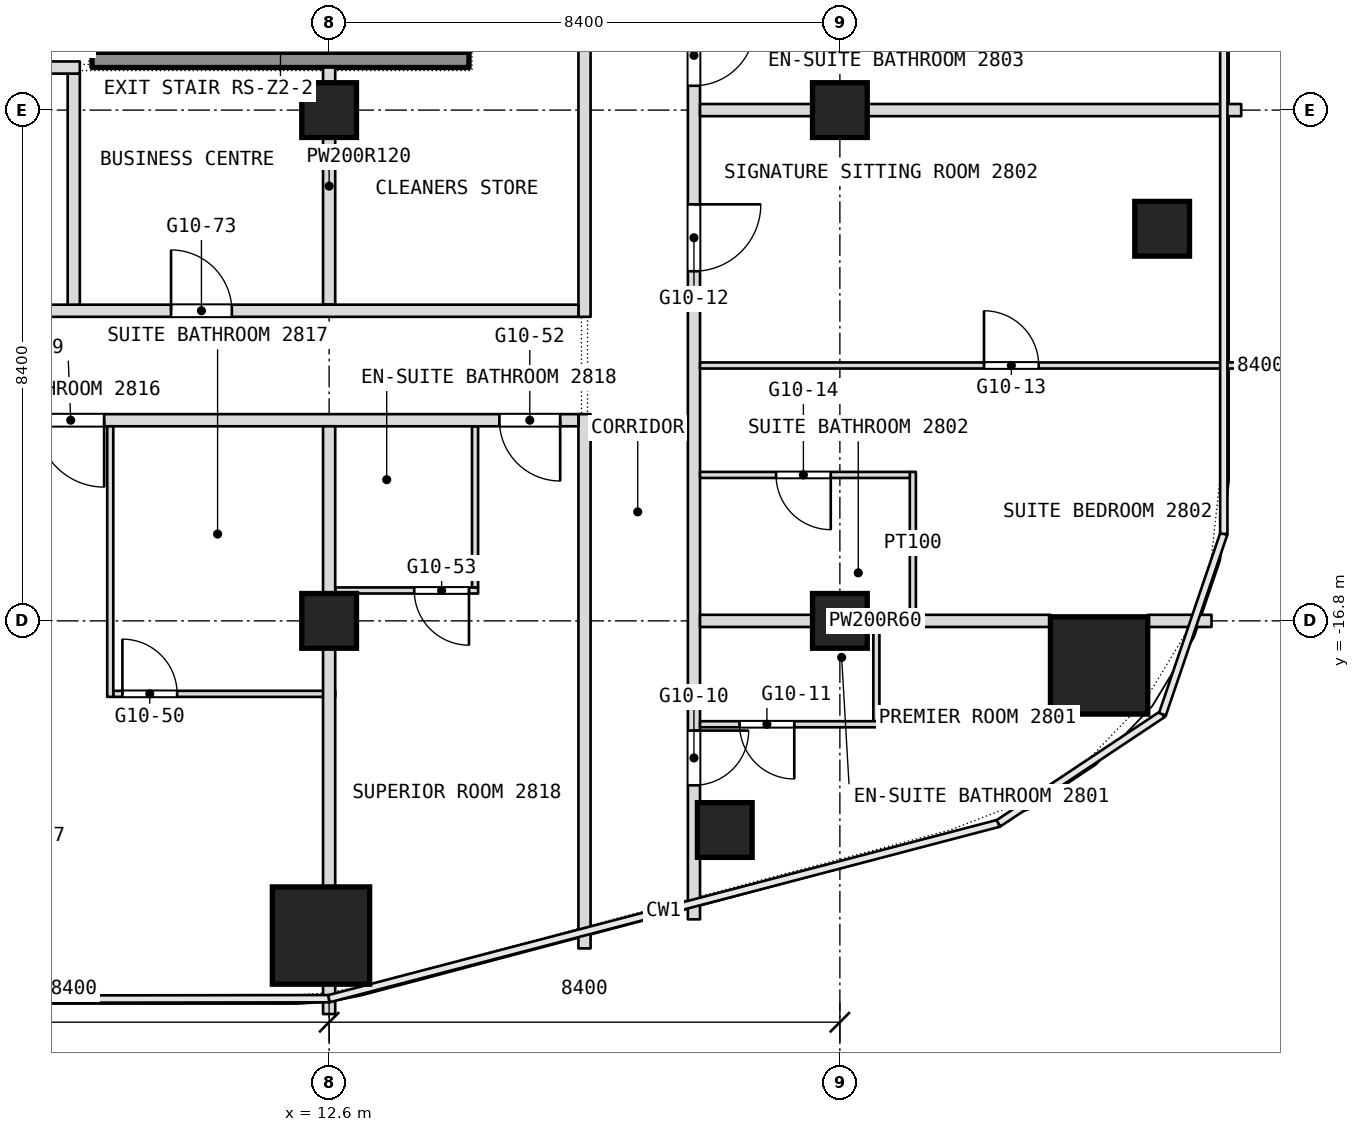
"""IFC4 building model, lengths in metres.
Left out: names, types, materials, properties, quantities, classifications, styles, units other than length and angle.
Written with IfcOpenShell. Run it as: python <this file> out.ifc"""

import sys

from ifc_helpers import new_model, si_unit, direction, frame, frame_2d, origin, origin_2d, place, context, subcontext, project, spatial, rectangle, extrude, element, fill, save


model = new_model("IFC4")
c1 = context("Model", 3, precision=1e-05, world=origin(), true_north=direction((0.0, 1.0)))
c2 = subcontext(c1, "Body", "Model", "MODEL_VIEW")
j1 = project(units=[si_unit("LENGTHUNIT", "METRE"), si_unit("PLANEANGLEUNIT", "RADIAN")], contexts=[c1])
p1 = place(None, origin())
s1 = spatial("IfcSite", under=j1, at=p1, CompositionType="ELEMENT")
p2 = place(p1, origin())
s2 = spatial("IfcBuilding", under=s1, at=p2, CompositionType="ELEMENT")
p3 = place(p2, frame((0.0, 0.0, 126.5)))
s3 = spatial("IfcBuildingStorey", under=s2, at=p3, CompositionType="ELEMENT", Elevation=126.5)
for number, where, z_axis, x_axis in (
    (1, (12.466, -21.975, 0.0), (0.0, 0.0, 1.0), (1.0, 0.0, 0.0)),
    (2, (25.263, -17.533, 0.0), (0.0, 0.0, 1.0), (1.0, 0.0, 0.0)),
):
    element("IfcColumn", number, at=place(p3, frame(where, z_axis=z_axis, x_axis=x_axis)), inside=s3, PredefinedType="COLUMN", context=c2, shape_type="SweptSolid", body=[
        extrude(rectangle(XDim=1.6, YDim=1.6, at=origin_2d()), origin(), (0.0, 0.0, 1.0), 3.6),
    ])
for number, where, z_axis, x_axis in (
    (3, (12.6, -16.8, 0.0), (0.0, 0.0, 1.0), (1.0, 0.0, 0.0)),
    (4, (12.6, -8.4, 0.0), (0.0, 0.0, 1.0), (1.0, 0.0, 0.0)),
    (5, (21.0, -16.8, 0.0), (0.0, 0.0, 1.0), (1.0, 0.0, 0.0)),
    (6, (21.0, -8.4, 0.0), (0.0, 0.0, 1.0), (1.0, 0.0, 0.0)),
    (7, (26.3, -10.352, 0.0), (0.0, 0.0, 1.0), (1.0, 0.0, 0.0)),
    (8, (19.107, -20.239, 0.0), (0.0, 0.0, 1.0), (1.0, 0.0, 0.0)),
):
    element("IfcColumn", number, at=place(p3, frame(where, z_axis=z_axis, x_axis=x_axis)), inside=s3, PredefinedType="COLUMN", context=c2, shape_type="SweptSolid", body=[
        extrude(rectangle(XDim=0.9, YDim=0.9, at=origin_2d()), origin(), (0.0, 0.0, 1.0), 3.6),
    ])
p4 = place(p3, frame((22.2, -16.7, 0.0), z_axis=(0.0, 0.0, 1.0), x_axis=(0.0, 1.0, 0.0)))
e9 = element("IfcWall", 9, at=p4, inside=s3, PredefinedType="PARTITIONING", context=c2, shape_type="SweptSolid", body=[
    extrude(rectangle(XDim=2.35, YDim=0.1, at=frame_2d((1.175, 0.0))), origin(), (0.0, 0.0, 1.0), 3.34),
])
p5 = place(p3, frame((21.6, -18.45, 0.0), z_axis=(0.0, 0.0, 1.0), x_axis=(0.0, 1.0, 0.0)))
e10 = element("IfcWall", 10, at=p5, inside=s3, PredefinedType="PARTITIONING", context=c2, shape_type="SweptSolid", body=[
    extrude(rectangle(XDim=1.75, YDim=0.1, at=frame_2d((0.875, 0.0))), origin(), (0.0, 0.0, 1.0), 3.34),
])
p6 = place(p3, frame((18.6, -21.708, 0.0), z_axis=(0.0, 0.0, 1.0), x_axis=(0.0, 1.0, 0.0)))
e11 = element("IfcWall", 11, at=p6, inside=s3, PredefinedType="PARTITIONING", context=c2, shape_type="SweptSolid", body=[
    extrude(rectangle(XDim=49.648, YDim=0.2, at=frame_2d((24.824, 0.0))), origin(), (0.0, 0.0, 1.0), 3.34),
])
p7 = place(p6, frame((2.204, 0.0, 0.0)))
e12 = element("IfcOpeningElement", 12, at=p7, cuts=e11, PredefinedType="OPENING", context=c2, shape_type="SweptSolid", body=[
    extrude(rectangle(XDim=0.9, YDim=2.1, at=frame_2d((0.45, 1.05))), frame((0.0, 0.1, 0.0), z_axis=(0.0, -1.0, 0.0), x_axis=(1.0, 0.0, 0.0)), (0.0, 0.0, 1.0), 0.2),
])
p8 = place(p6, frame((10.658, 0.0, 0.0)))
e13 = element("IfcOpeningElement", 13, at=p8, cuts=e11, PredefinedType="OPENING", context=c2, shape_type="SweptSolid", body=[
    extrude(rectangle(XDim=1.1, YDim=2.1, at=frame_2d((0.55, 1.05))), frame((0.0, 0.1, 0.0), z_axis=(0.0, -1.0, 0.0), x_axis=(1.0, 0.0, 0.0)), (0.0, 0.0, 1.0), 0.2),
])
p9 = place(p6, frame((13.708, 0.0, 0.0)))
e14 = element("IfcOpeningElement", 14, at=p9, cuts=e11, PredefinedType="OPENING", context=c2, shape_type="SweptSolid", body=[
    extrude(rectangle(XDim=1.0, YDim=2.1, at=frame_2d((0.5, 1.05))), frame((0.0, 0.1, 0.0), z_axis=(0.0, -1.0, 0.0), x_axis=(1.0, 0.0, 0.0)), (0.0, 0.0, 1.0), 0.2),
])
p10 = place(p6, frame((20.308, 0.0, 0.0)))
e15 = element("IfcOpeningElement", 15, at=p10, cuts=e11, PredefinedType="OPENING", context=c2, shape_type="SweptSolid", body=[
    extrude(rectangle(XDim=1.0, YDim=2.1, at=frame_2d((0.5, 1.05))), frame((0.0, 0.1, 0.0), z_axis=(0.0, -1.0, 0.0), x_axis=(1.0, 0.0, 0.0)), (0.0, 0.0, 1.0), 0.2),
])
p11 = place(p6, frame((25.408, 0.0, 0.0)))
e16 = element("IfcOpeningElement", 16, at=p11, cuts=e11, PredefinedType="OPENING", context=c2, shape_type="SweptSolid", body=[
    extrude(rectangle(XDim=1.1, YDim=2.1, at=frame_2d((0.55, 1.05))), frame((0.0, 0.1, 0.0), z_axis=(0.0, -1.0, 0.0), x_axis=(1.0, 0.0, 0.0)), (0.0, 0.0, 1.0), 0.2),
])
p12 = place(p6, frame((30.508, 0.0, 0.0)))
e17 = element("IfcOpeningElement", 17, at=p12, cuts=e11, PredefinedType="OPENING", context=c2, shape_type="SweptSolid", body=[
    extrude(rectangle(XDim=1.0, YDim=2.1, at=frame_2d((0.5, 1.05))), frame((0.0, 0.1, 0.0), z_axis=(0.0, -1.0, 0.0), x_axis=(1.0, 0.0, 0.0)), (0.0, 0.0, 1.0), 0.2),
])
p13 = place(p6, frame((37.108, 0.0, 0.0)))
e18 = element("IfcOpeningElement", 18, at=p13, cuts=e11, PredefinedType="OPENING", context=c2, shape_type="SweptSolid", body=[
    extrude(rectangle(XDim=1.0, YDim=2.1, at=frame_2d((0.5, 1.05))), frame((0.0, 0.1, 0.0), z_axis=(0.0, -1.0, 0.0), x_axis=(1.0, 0.0, 0.0)), (0.0, 0.0, 1.0), 0.2),
])
p14 = place(p6, frame((42.608, 0.0, 0.0)))
e19 = element("IfcOpeningElement", 19, at=p14, cuts=e11, PredefinedType="OPENING", context=c2, shape_type="SweptSolid", body=[
    extrude(rectangle(XDim=1.0, YDim=2.1, at=frame_2d((0.5, 1.05))), frame((0.0, 0.1, 0.0), z_axis=(0.0, -1.0, 0.0), x_axis=(1.0, 0.0, 0.0)), (0.0, 0.0, 1.0), 0.2),
])
p15 = place(p6, frame((44.608, 0.0, 0.0)))
e20 = element("IfcOpeningElement", 20, at=p15, cuts=e11, PredefinedType="OPENING", context=c2, shape_type="SweptSolid", body=[
    extrude(rectangle(XDim=1.0, YDim=2.1, at=frame_2d((0.5, 1.05))), frame((0.0, 0.1, 0.0), z_axis=(0.0, -1.0, 0.0), x_axis=(1.0, 0.0, 0.0)), (0.0, 0.0, 1.0), 0.2),
])
p16 = place(p3, frame((18.7, -18.5, 0.0), z_axis=(0.0, 0.0, 1.0), x_axis=(1.0, 0.0, 0.0)))
e21 = element("IfcWall", 21, at=p16, inside=s3, PredefinedType="PARTITIONING", context=c2, shape_type="SweptSolid", body=[
    extrude(rectangle(XDim=2.95, YDim=0.1, at=frame_2d((1.475, 0.0))), origin(), (0.0, 0.0, 1.0), 3.34),
])
p17 = place(p16, frame((0.65, 0.0, 0.0)))
e22 = element("IfcOpeningElement", 22, at=p17, cuts=e21, PredefinedType="OPENING", context=c2, shape_type="SweptSolid", body=[
    extrude(rectangle(XDim=0.9, YDim=2.1, at=frame_2d((0.45, 1.05))), frame((0.0, 0.05, 0.0), z_axis=(0.0, -1.0, 0.0), x_axis=(1.0, 0.0, 0.0)), (0.0, 0.0, 1.0), 0.1),
])
p18 = place(p3, frame((9.05, -18.0, 0.0), z_axis=(0.0, 0.0, 1.0), x_axis=(1.0, 0.0, 0.0)))
e23 = element("IfcWall", 23, at=p18, inside=s3, PredefinedType="PARTITIONING", context=c2, shape_type="SweptSolid", body=[
    extrude(rectangle(XDim=3.65, YDim=0.1, at=frame_2d((1.825, 0.0))), origin(), (0.0, 0.0, 1.0), 3.34),
])
p19 = place(p18, frame((0.15, 0.0, 0.0)))
e24 = element("IfcOpeningElement", 24, at=p19, cuts=e23, PredefinedType="OPENING", context=c2, shape_type="SweptSolid", body=[
    extrude(rectangle(XDim=0.9, YDim=2.1, at=frame_2d((0.45, 1.05))), frame((0.0, 0.05, 0.0), z_axis=(0.0, -1.0, 0.0), x_axis=(1.0, 0.0, 0.0)), (0.0, 0.0, 1.0), 0.1),
])
p20 = place(p3, frame((16.8, -22.186, 0.0), z_axis=(0.0, 0.0, 1.0), x_axis=(0.0, 1.0, 0.0)))
e25 = element("IfcWall", 25, at=p20, inside=s3, PredefinedType="PARTITIONING", context=c2, shape_type="SweptSolid", body=[
    extrude(rectangle(XDim=8.786, YDim=0.2, at=frame_2d((4.393, 0.0))), origin(), (0.0, 0.0, 1.0), 3.34),
])
p21 = place(p3, frame((16.8, -11.8, 0.0), z_axis=(0.0, 0.0, 1.0), x_axis=(0.0, 1.0, 0.0)))
e26 = element("IfcWall", 26, at=p21, inside=s3, PredefinedType="PARTITIONING", context=c2, shape_type="SweptSolid", body=[
    extrude(rectangle(XDim=9.9, YDim=0.2, at=frame_2d((4.95, 0.0))), origin(), (0.0, 0.0, 1.0), 3.34),
])
p22 = place(p3, frame((18.7, -16.8, 0.0), z_axis=(0.0, 0.0, 1.0), x_axis=(1.0, 0.0, 0.0)))
e27 = element("IfcWall", 27, at=p22, inside=s3, PredefinedType="PARTITIONING", context=c2, shape_type="SweptSolid", body=[
    extrude(rectangle(XDim=5.763, YDim=0.2, at=frame_2d((2.881, 0.0))), origin(), (0.0, 0.0, 1.0), 2.89),
])
p23 = place(p3, frame((26.063, -16.8, 0.0), z_axis=(0.0, 0.0, 1.0), x_axis=(1.0, 0.0, 0.0)))
e28 = element("IfcWall", 28, at=p23, inside=s3, PredefinedType="PARTITIONING", context=c2, shape_type="SweptSolid", body=[
    extrude(rectangle(XDim=1.049, YDim=0.2, at=frame_2d((0.524, 0.0))), origin(), (0.0, 0.0, 1.0), 3.34),
])
p24 = place(p3, frame((12.7, -16.3, 0.0), z_axis=(0.0, 0.0, 1.0), x_axis=(1.0, 0.0, 0.0)))
e29 = element("IfcWall", 29, at=p24, inside=s3, PredefinedType="PARTITIONING", context=c2, shape_type="SweptSolid", body=[
    extrude(rectangle(XDim=2.35, YDim=0.1, at=frame_2d((1.175, 0.0))), origin(), (0.0, 0.0, 1.0), 3.34),
])
p25 = place(p24, frame((1.3, 0.0, 0.0)))
e30 = element("IfcOpeningElement", 30, at=p25, cuts=e29, PredefinedType="OPENING", context=c2, shape_type="SweptSolid", body=[
    extrude(rectangle(XDim=0.9, YDim=2.1, at=frame_2d((0.45, 1.05))), frame((0.0, 0.05, 0.0), z_axis=(0.0, -1.0, 0.0), x_axis=(1.0, 0.0, 0.0)), (0.0, 0.0, 1.0), 0.1),
])
p26 = place(p3, frame((15.0, -16.25, 0.0), z_axis=(0.0, 0.0, 1.0), x_axis=(0.0, 1.0, 0.0)))
e31 = element("IfcWall", 31, at=p26, inside=s3, PredefinedType="PARTITIONING", context=c2, shape_type="SweptSolid", body=[
    extrude(rectangle(XDim=2.65, YDim=0.1, at=frame_2d((1.325, 0.0))), origin(), (0.0, 0.0, 1.0), 3.34),
])
p27 = place(p3, frame((18.7, -14.4, 0.0), z_axis=(0.0, 0.0, 1.0), x_axis=(1.0, 0.0, 0.0)))
e32 = element("IfcWall", 32, at=p27, inside=s3, PredefinedType="PARTITIONING", context=c2, shape_type="SweptSolid", body=[
    extrude(rectangle(XDim=3.45, YDim=0.1, at=frame_2d((1.725, 0.0))), origin(), (0.0, 0.0, 1.0), 3.34),
])
p28 = place(p27, frame((1.25, 0.0, 0.0)))
e33 = element("IfcOpeningElement", 33, at=p28, cuts=e32, PredefinedType="OPENING", context=c2, shape_type="SweptSolid", body=[
    extrude(rectangle(XDim=0.9, YDim=2.1, at=frame_2d((0.45, 1.05))), frame((0.0, 0.05, 0.0), z_axis=(0.0, -1.0, 0.0), x_axis=(1.0, 0.0, 0.0)), (0.0, 0.0, 1.0), 0.1),
])
p29 = place(p3, frame((-3.2, -13.5, 0.0), z_axis=(0.0, 0.0, 1.0), x_axis=(1.0, 0.0, 0.0)))
e34 = element("IfcWall", 34, at=p29, inside=s3, PredefinedType="PARTITIONING", context=c2, shape_type="SweptSolid", body=[
    extrude(rectangle(XDim=19.9, YDim=0.2, at=frame_2d((9.95, 0.0))), origin(), (0.0, 0.0, 1.0), 3.34),
])
p30 = place(p29, frame((1.8, 0.0, 0.0)))
e35 = element("IfcOpeningElement", 35, at=p30, cuts=e34, PredefinedType="OPENING", context=c2, shape_type="SweptSolid", body=[
    extrude(rectangle(XDim=1.0, YDim=2.1, at=frame_2d((0.5, 1.05))), frame((0.0, 0.1, 0.0), z_axis=(0.0, -1.0, 0.0), x_axis=(1.0, 0.0, 0.0)), (0.0, 0.0, 1.0), 0.2),
])
p31 = place(p29, frame((3.6, 0.0, 0.0)))
e36 = element("IfcOpeningElement", 36, at=p31, cuts=e34, PredefinedType="OPENING", context=c2, shape_type="SweptSolid", body=[
    extrude(rectangle(XDim=1.0, YDim=2.1, at=frame_2d((0.5, 1.05))), frame((0.0, 0.1, 0.0), z_axis=(0.0, -1.0, 0.0), x_axis=(1.0, 0.0, 0.0)), (0.0, 0.0, 1.0), 0.2),
])
p32 = place(p29, frame((11.0, 0.0, 0.0)))
e37 = element("IfcOpeningElement", 37, at=p32, cuts=e34, PredefinedType="OPENING", context=c2, shape_type="SweptSolid", body=[
    extrude(rectangle(XDim=1.1, YDim=2.1, at=frame_2d((0.55, 1.05))), frame((0.0, 0.1, 0.0), z_axis=(0.0, -1.0, 0.0), x_axis=(1.0, 0.0, 0.0)), (0.0, 0.0, 1.0), 0.2),
])
p33 = place(p29, frame((18.6, 0.0, 0.0)))
e38 = element("IfcOpeningElement", 38, at=p33, cuts=e34, PredefinedType="OPENING", context=c2, shape_type="SweptSolid", body=[
    extrude(rectangle(XDim=1.0, YDim=2.1, at=frame_2d((0.5, 1.05))), frame((0.0, 0.1, 0.0), z_axis=(0.0, -1.0, 0.0), x_axis=(1.0, 0.0, 0.0)), (0.0, 0.0, 1.0), 0.2),
])
p34 = place(p3, frame((12.6, -23.266, 0.0), z_axis=(0.0, 0.0, 1.0), x_axis=(0.0, 1.0, 0.0)))
e39 = element("IfcWall", 39, at=p34, inside=s3, PredefinedType="PARTITIONING", context=c2, shape_type="SweptSolid", body=[
    extrude(rectangle(XDim=0.491, YDim=0.2, at=frame_2d((0.246, 0.0))), origin(), (0.0, 0.0, 1.0), 3.34),
])
p35 = place(p3, frame((12.6, -21.175, 0.0), z_axis=(0.0, 0.0, 1.0), x_axis=(0.0, 1.0, 0.0)))
e40 = element("IfcWall", 40, at=p35, inside=s3, PredefinedType="PARTITIONING", context=c2, shape_type="SweptSolid", body=[
    extrude(rectangle(XDim=7.575, YDim=0.2, at=frame_2d((3.788, 0.0))), origin(), (0.0, 0.0, 1.0), 3.34),
])
p36 = place(p3, frame((12.6, -11.6, 0.0), z_axis=(0.0, 0.0, 1.0), x_axis=(0.0, 1.0, 0.0)))
e41 = element("IfcWall", 41, at=p36, inside=s3, PredefinedType="PARTITIONING", context=c2, shape_type="SweptSolid", body=[
    extrude(rectangle(XDim=3.9, YDim=0.2, at=frame_2d((1.95, 0.0))), origin(), (0.0, 0.0, 1.0), 3.34),
])
p37 = place(p3, frame((18.7, -12.6, 0.0), z_axis=(0.0, 0.0, 1.0), x_axis=(1.0, 0.0, 0.0)))
e42 = element("IfcWall", 42, at=p37, inside=s3, PredefinedType="PARTITIONING", context=c2, shape_type="SweptSolid", body=[
    extrude(rectangle(XDim=8.9, YDim=0.1, at=frame_2d((4.45, 0.0))), origin(), (0.0, 0.0, 1.0), 3.34),
])
p38 = place(p37, frame((4.67, 0.0, 0.0)))
e43 = element("IfcOpeningElement", 43, at=p38, cuts=e42, PredefinedType="OPENING", context=c2, shape_type="SweptSolid", body=[
    extrude(rectangle(XDim=0.9, YDim=2.1, at=frame_2d((0.45, 1.05))), frame((0.0, 0.05, 0.0), z_axis=(0.0, -1.0, 0.0), x_axis=(1.0, 0.0, 0.0)), (0.0, 0.0, 1.0), 0.1),
])
p39 = place(p3, frame((-4.1, -11.7, 0.0), z_axis=(0.0, 0.0, 1.0), x_axis=(1.0, 0.0, 0.0)))
e44 = element("IfcWall", 44, at=p39, inside=s3, PredefinedType="PARTITIONING", context=c2, shape_type="SweptSolid", body=[
    extrude(rectangle(XDim=20.8, YDim=0.2, at=frame_2d((10.4, 0.0))), origin(), (0.0, 0.0, 1.0), 3.34),
])
p40 = place(p39, frame((14.1, 0.0, 0.0)))
e45 = element("IfcOpeningElement", 45, at=p40, cuts=e44, PredefinedType="OPENING", context=c2, shape_type="SweptSolid", body=[
    extrude(rectangle(XDim=1.0, YDim=2.1, at=frame_2d((0.5, 1.05))), frame((0.0, 0.1, 0.0), z_axis=(0.0, -1.0, 0.0), x_axis=(1.0, 0.0, 0.0)), (0.0, 0.0, 1.0), 0.2),
])
p41 = place(p3, frame((9.0, -18.05, 0.0), z_axis=(0.0, 0.0, 1.0), x_axis=(0.0, 1.0, 0.0)))
e46 = element("IfcWall", 46, at=p41, inside=s3, PredefinedType="PARTITIONING", context=c2, shape_type="SweptSolid", body=[
    extrude(rectangle(XDim=4.45, YDim=0.1, at=frame_2d((2.225, 0.0))), origin(), (0.0, 0.0, 1.0), 3.34),
])
p42 = place(p3, frame((8.4, -11.6, 0.0), z_axis=(0.0, 0.0, 1.0), x_axis=(0.0, 1.0, 0.0)))
e47 = element("IfcWall", 47, at=p42, inside=s3, PredefinedType="PARTITIONING", context=c2, shape_type="SweptSolid", body=[
    extrude(rectangle(XDim=3.8, YDim=0.2, at=frame_2d((1.9, 0.0))), origin(), (0.0, 0.0, 1.0), 3.34),
])
p43 = place(p3, frame((18.7, -8.4, 0.0), z_axis=(0.0, 0.0, 1.0), x_axis=(1.0, 0.0, 0.0)))
e48 = element("IfcWall", 48, at=p43, inside=s3, PredefinedType="PARTITIONING", context=c2, shape_type="SweptSolid", body=[
    extrude(rectangle(XDim=8.9, YDim=0.2, at=frame_2d((4.45, 0.0))), origin(), (0.0, 0.0, 1.0), 2.89),
])
p44 = place(p3, frame((7.2, -7.7, 0.0), z_axis=(0.0, 0.0, 1.0), x_axis=(1.0, 0.0, 0.0)))
e49 = element("IfcWall", 49, at=p44, inside=s3, PredefinedType="PARTITIONING", context=c2, shape_type="SweptSolid", body=[
    extrude(rectangle(XDim=1.3, YDim=0.2, at=frame_2d((0.65, 0.0))), origin(), (0.0, 0.0, 1.0), 3.34),
])
p45 = place(p3, frame((8.7, -7.575, 0.1), z_axis=(0.0, 0.0, 1.0), x_axis=(1.0, 0.0, 0.0)))
e50 = element("IfcWall", 50, at=p45, inside=s3, PredefinedType="SHEAR", context=c2, shape_type="SweptSolid", body=[
    extrude(rectangle(XDim=6.2, YDim=0.25, at=frame_2d((3.1, 0.0))), origin(), (0.0, 0.0, 1.0), 3.6),
])
p46 = place(p7, origin())
e51 = element("IfcDoor", 51, at=p46, inside=s3, OperationType="SINGLE_SWING_LEFT", PredefinedType="DOOR", context=c2, shape_type="SweptSolid", body=[
    extrude(rectangle(XDim=0.9, YDim=2.1, at=frame_2d((0.45, 1.05))), frame((0.0, 0.025, 0.0), z_axis=(0.0, -1.0, 0.0), x_axis=(1.0, 0.0, 0.0)), (0.0, 0.0, 1.0), 0.05),
])
fill(e12, e51)
p47 = place(p8, origin())
e52 = element("IfcDoor", 52, at=p47, inside=s3, OperationType="SINGLE_SWING_RIGHT", PredefinedType="DOOR", context=c2, shape_type="SweptSolid", body=[
    extrude(rectangle(XDim=1.1, YDim=2.1, at=frame_2d((0.55, 1.05))), frame((0.0, 0.025, 0.0), z_axis=(0.0, -1.0, 0.0), x_axis=(1.0, 0.0, 0.0)), (0.0, 0.0, 1.0), 0.05),
])
fill(e13, e52)
p48 = place(p9, origin())
e53 = element("IfcDoor", 53, at=p48, inside=s3, OperationType="SINGLE_SWING_LEFT", PredefinedType="DOOR", context=c2, shape_type="SweptSolid", body=[
    extrude(rectangle(XDim=1.0, YDim=2.1, at=frame_2d((0.5, 1.05))), frame((0.0, 0.025, 0.0), z_axis=(0.0, -1.0, 0.0), x_axis=(1.0, 0.0, 0.0)), (0.0, 0.0, 1.0), 0.05),
])
fill(e14, e53)
p49 = place(p17, origin())
e54 = element("IfcDoor", 54, at=p49, inside=s3, OperationType="SINGLE_SWING_LEFT", PredefinedType="DOOR", context=c2, shape_type="SweptSolid", body=[
    extrude(rectangle(XDim=0.9, YDim=2.1, at=frame_2d((0.45, 1.05))), frame((0.0, 0.025, 0.0), z_axis=(0.0, -1.0, 0.0), x_axis=(1.0, 0.0, 0.0)), (0.0, 0.0, 1.0), 0.05),
])
fill(e22, e54)
p50 = place(p19, origin())
e55 = element("IfcDoor", 55, at=p50, inside=s3, OperationType="SINGLE_SWING_LEFT", PredefinedType="DOOR", context=c2, shape_type="SweptSolid", body=[
    extrude(rectangle(XDim=0.9, YDim=2.1, at=frame_2d((0.45, 1.05))), frame((0.0, 0.025, 0.0), z_axis=(0.0, -1.0, 0.0), x_axis=(1.0, 0.0, 0.0)), (0.0, 0.0, 1.0), 0.05),
])
fill(e24, e55)
p51 = place(p25, origin())
e56 = element("IfcDoor", 56, at=p51, inside=s3, OperationType="SINGLE_SWING_RIGHT", PredefinedType="DOOR", context=c2, shape_type="SweptSolid", body=[
    extrude(rectangle(XDim=0.9, YDim=2.1, at=frame_2d((0.45, 1.05))), frame((0.0, 0.025, 0.0), z_axis=(0.0, -1.0, 0.0), x_axis=(1.0, 0.0, 0.0)), (0.0, 0.0, 1.0), 0.05),
])
fill(e30, e56)
p52 = place(p28, origin())
e57 = element("IfcDoor", 57, at=p52, inside=s3, OperationType="SINGLE_SWING_RIGHT", PredefinedType="DOOR", context=c2, shape_type="SweptSolid", body=[
    extrude(rectangle(XDim=0.9, YDim=2.1, at=frame_2d((0.45, 1.05))), frame((0.0, 0.025, 0.0), z_axis=(0.0, -1.0, 0.0), x_axis=(1.0, 0.0, 0.0)), (0.0, 0.0, 1.0), 0.05),
])
fill(e33, e57)
p53 = place(p32, origin())
e58 = element("IfcDoor", 58, at=p53, inside=s3, OperationType="SINGLE_SWING_LEFT", PredefinedType="DOOR", context=c2, shape_type="SweptSolid", body=[
    extrude(rectangle(XDim=1.1, YDim=2.1, at=frame_2d((0.55, 1.05))), frame((0.0, 0.025, 0.0), z_axis=(0.0, -1.0, 0.0), x_axis=(1.0, 0.0, 0.0)), (0.0, 0.0, 1.0), 0.05),
])
fill(e37, e58)
p54 = place(p33, origin())
e59 = element("IfcDoor", 59, at=p54, inside=s3, OperationType="SINGLE_SWING_LEFT", PredefinedType="DOOR", context=c2, shape_type="SweptSolid", body=[
    extrude(rectangle(XDim=1.0, YDim=2.1, at=frame_2d((0.5, 1.05))), frame((0.0, 0.025, 0.0), z_axis=(0.0, -1.0, 0.0), x_axis=(1.0, 0.0, 0.0)), (0.0, 0.0, 1.0), 0.05),
])
fill(e38, e59)
p55 = place(p38, origin())
e60 = element("IfcDoor", 60, at=p55, inside=s3, OperationType="SINGLE_SWING_RIGHT", PredefinedType="DOOR", context=c2, shape_type="SweptSolid", body=[
    extrude(rectangle(XDim=0.9, YDim=2.1, at=frame_2d((0.45, 1.05))), frame((0.0, 0.025, 0.0), z_axis=(0.0, -1.0, 0.0), x_axis=(1.0, 0.0, 0.0)), (0.0, 0.0, 1.0), 0.05),
])
fill(e43, e60)
p56 = place(p40, origin())
e61 = element("IfcDoor", 61, at=p56, inside=s3, OperationType="SINGLE_SWING_LEFT", PredefinedType="DOOR", context=c2, shape_type="SweptSolid", body=[
    extrude(rectangle(XDim=1.0, YDim=2.1, at=frame_2d((0.5, 1.05))), frame((0.0, 0.025, 0.0), z_axis=(0.0, -1.0, 0.0), x_axis=(1.0, 0.0, 0.0)), (0.0, 0.0, 1.0), 0.05),
])
fill(e45, e61)
save(model, sys.argv[1])
